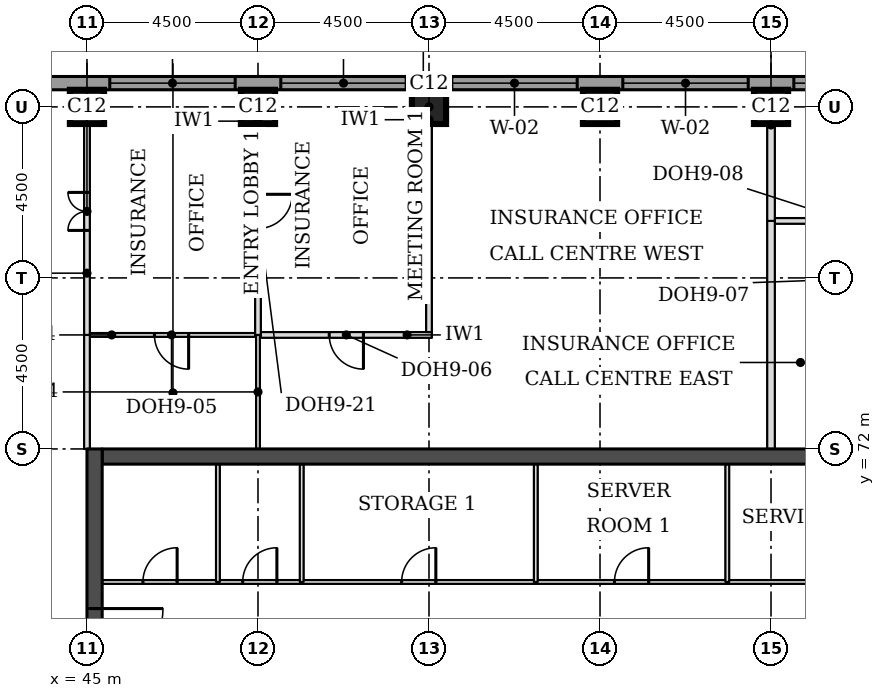
"""IFC4 building model, lengths in metres.
Left out: names, types, materials, properties, quantities, classifications, styles, units other than length and angle.
Written with IfcOpenShell. Run it as: python <this file> out.ifc"""

import sys

from ifc_helpers import new_model, si_unit, direction, frame, frame_2d, origin, origin_2d, place, context, subcontext, project, spatial, rectangle, extrude, element, fill, save


model = new_model("IFC4")
c1 = context("Model", 3, precision=1e-05, world=origin(), true_north=direction((0.0, 1.0)))
c2 = subcontext(c1, "Body", "Model", "MODEL_VIEW")
j1 = project(units=[si_unit("LENGTHUNIT", "METRE"), si_unit("PLANEANGLEUNIT", "RADIAN")], contexts=[c1])
p1 = place(None, origin())
s1 = spatial("IfcSite", under=j1, at=p1, CompositionType="ELEMENT")
p2 = place(p1, origin())
s2 = spatial("IfcBuilding", under=s1, at=p2, CompositionType="ELEMENT")
p3 = place(p2, frame((0.0, 0.0, 215.6)))
s3 = spatial("IfcBuildingStorey", under=s2, at=p3, CompositionType="ELEMENT", Elevation=215.6)
for number, where, z_axis, x_axis in (
    (1, (45.0, 81.0, 0.0), (0.0, 0.0, 1.0), (1.0, 0.0, 0.0)),
    (2, (49.5, 81.0, 0.0), (0.0, 0.0, 1.0), (1.0, 0.0, 0.0)),
    (3, (54.0, 81.0, 0.0), (0.0, 0.0, 1.0), (1.0, 0.0, 0.0)),
    (4, (58.5, 81.0, 0.0), (0.0, 0.0, 1.0), (1.0, 0.0, 0.0)),
    (5, (63.0, 81.0, 0.0), (0.0, 0.0, 1.0), (1.0, 0.0, 0.0)),
):
    element("IfcColumn", number, at=place(p3, frame(where, z_axis=z_axis, x_axis=x_axis)), inside=s3, PredefinedType="COLUMN", context=c2, shape_type="SweptSolid", body=[
        extrude(rectangle(XDim=0.9, YDim=0.9, at=origin_2d()), origin(), (0.0, 0.0, 1.0), 3.7),
    ])
p4 = place(p3, frame((45.4, 71.8, 0.0), z_axis=(0.0, 0.0, 1.0), x_axis=(1.0, 0.0, 0.0)))
e6 = element("IfcWall", 6, at=p4, inside=s3, PredefinedType="SHEAR", context=c2, shape_type="SweptSolid", body=[
    extrude(rectangle(XDim=21.7, YDim=0.4, at=frame_2d((10.85, 0.0))), origin(), (0.0, 0.0, 1.0), 3.7),
])
p5 = place(p3, frame((45.2, 49.5, 0.0), z_axis=(0.0, 0.0, 1.0), x_axis=(0.0, 1.0, 0.0)))
e7 = element("IfcWall", 7, at=p5, inside=s3, PredefinedType="SHEAR", context=c2, shape_type="SweptSolid", body=[
    extrude(rectangle(XDim=22.5, YDim=0.4, at=frame_2d((11.25, 0.0))), origin(), (0.0, 0.0, 1.0), 3.7),
])
p6 = place(p5, frame((4.2, 0.0, 0.0)))
e8 = element("IfcOpeningElement", 8, at=p6, cuts=e7, PredefinedType="OPENING", context=c2, shape_type="SweptSolid", body=[
    extrude(rectangle(XDim=1.8, YDim=2.1, at=frame_2d((0.9, 1.05))), frame((0.0, 0.21, 0.0), z_axis=(0.0, -1.0, 0.0), x_axis=(1.0, 0.0, 0.0)), (0.0, 0.0, 1.0), 0.42),
])
p7 = place(p5, frame((6.9, 0.0, 0.0)))
e9 = element("IfcOpeningElement", 9, at=p7, cuts=e7, PredefinedType="OPENING", context=c2, shape_type="SweptSolid", body=[
    extrude(rectangle(XDim=1.1, YDim=2.1, at=frame_2d((0.55, 1.05))), frame((0.0, 0.21, 0.0), z_axis=(0.0, -1.0, 0.0), x_axis=(1.0, 0.0, 0.0)), (0.0, 0.0, 1.0), 0.42),
])
p8 = place(p5, frame((13.6, 0.0, 0.0)))
e10 = element("IfcOpeningElement", 10, at=p8, cuts=e7, PredefinedType="OPENING", context=c2, shape_type="SweptSolid", body=[
    extrude(rectangle(XDim=1.1, YDim=2.1, at=frame_2d((0.55, 1.05))), frame((0.0, 0.21, 0.0), z_axis=(0.0, -1.0, 0.0), x_axis=(1.0, 0.0, 0.0)), (0.0, 0.0, 1.0), 0.42),
])
p9 = place(p5, frame((16.5, 0.0, 0.0)))
e11 = element("IfcOpeningElement", 11, at=p9, cuts=e7, PredefinedType="OPENING", context=c2, shape_type="SweptSolid", body=[
    extrude(rectangle(XDim=1.8, YDim=2.1, at=frame_2d((0.9, 1.05))), frame((0.0, 0.21, 0.0), z_axis=(0.0, -1.0, 0.0), x_axis=(1.0, 0.0, 0.0)), (0.0, 0.0, 1.0), 0.42),
])
p10 = place(p3, frame((72.331, 81.625, 0.0), z_axis=(0.0, 0.0, 1.0), x_axis=(-1.0, 0.0, 0.0)))
e12 = element("IfcWall", 12, at=p10, inside=s3, PredefinedType="STANDARD", context=c2, shape_type="SweptSolid", body=[
    extrude(rectangle(XDim=32.163, YDim=0.35, at=frame_2d((16.081, 0.0))), origin(), (0.0, 0.0, 1.0), 3.525),
])
p11 = place(p10, frame((5.431, 0.0, 0.9)))
e13 = element("IfcOpeningElement", 13, at=p11, cuts=e12, PredefinedType="OPENING", context=c2, shape_type="SweptSolid", body=[
    extrude(rectangle(XDim=3.3, YDim=1.9, at=frame_2d((1.65, 0.95))), frame((0.0, 0.185, 0.0), z_axis=(0.0, -1.0, 0.0), x_axis=(1.0, 0.0, 0.0)), (0.0, 0.0, 1.0), 0.37),
])
p12 = place(p10, frame((9.931, 0.0, 0.9)))
e14 = element("IfcOpeningElement", 14, at=p12, cuts=e12, PredefinedType="OPENING", context=c2, shape_type="SweptSolid", body=[
    extrude(rectangle(XDim=3.3, YDim=1.9, at=frame_2d((1.65, 0.95))), frame((0.0, 0.185, 0.0), z_axis=(0.0, -1.0, 0.0), x_axis=(1.0, 0.0, 0.0)), (0.0, 0.0, 1.0), 0.37),
])
p13 = place(p10, frame((14.431, 0.0, 0.9)))
e15 = element("IfcOpeningElement", 15, at=p13, cuts=e12, PredefinedType="OPENING", context=c2, shape_type="SweptSolid", body=[
    extrude(rectangle(XDim=3.3, YDim=1.9, at=frame_2d((1.65, 0.95))), frame((0.0, 0.185, 0.0), z_axis=(0.0, -1.0, 0.0), x_axis=(1.0, 0.0, 0.0)), (0.0, 0.0, 1.0), 0.37),
])
p14 = place(p10, frame((18.931, 0.0, 0.9)))
e16 = element("IfcOpeningElement", 16, at=p14, cuts=e12, PredefinedType="OPENING", context=c2, shape_type="SweptSolid", body=[
    extrude(rectangle(XDim=3.3, YDim=1.9, at=frame_2d((1.65, 0.95))), frame((0.0, 0.185, 0.0), z_axis=(0.0, -1.0, 0.0), x_axis=(1.0, 0.0, 0.0)), (0.0, 0.0, 1.0), 0.37),
])
p15 = place(p10, frame((23.431, 0.0, 0.9)))
e17 = element("IfcOpeningElement", 17, at=p15, cuts=e12, PredefinedType="OPENING", context=c2, shape_type="SweptSolid", body=[
    extrude(rectangle(XDim=3.3, YDim=1.9, at=frame_2d((1.65, 0.95))), frame((0.0, 0.185, 0.0), z_axis=(0.0, -1.0, 0.0), x_axis=(1.0, 0.0, 0.0)), (0.0, 0.0, 1.0), 0.37),
])
p16 = place(p3, frame((45.075, 75.0, 0.0), z_axis=(0.0, 0.0, 1.0), x_axis=(1.0, 0.0, 0.0)))
e18 = element("IfcWall", 18, at=p16, inside=s3, PredefinedType="PARTITIONING", context=c2, shape_type="SweptSolid", body=[
    extrude(rectangle(XDim=4.35, YDim=0.1, at=frame_2d((2.175, 0.0))), origin(), (0.0, 0.0, 1.0), 3.55),
])
p17 = place(p16, frame((1.7, 0.0, 0.0)))
e19 = element("IfcOpeningElement", 19, at=p17, cuts=e18, PredefinedType="OPENING", context=c2, shape_type="SweptSolid", body=[
    extrude(rectangle(XDim=0.9, YDim=2.1, at=frame_2d((0.45, 1.05))), frame((0.0, 0.06, 0.0), z_axis=(0.0, -1.0, 0.0), x_axis=(1.0, 0.0, 0.0)), (0.0, 0.0, 1.0), 0.12),
])
p18 = place(p3, frame((49.575, 75.0, 0.0), z_axis=(0.0, 0.0, 1.0), x_axis=(1.0, 0.0, 0.0)))
e20 = element("IfcWall", 20, at=p18, inside=s3, PredefinedType="PARTITIONING", context=c2, shape_type="SweptSolid", body=[
    extrude(rectangle(XDim=4.5, YDim=0.15, at=frame_2d((2.25, 0.0))), origin(), (0.0, 0.0, 1.0), 3.55),
])
p19 = place(p18, frame((1.8, 0.0, 0.0)))
e21 = element("IfcOpeningElement", 21, at=p19, cuts=e20, PredefinedType="OPENING", context=c2, shape_type="SweptSolid", body=[
    extrude(rectangle(XDim=0.9, YDim=2.1, at=frame_2d((0.45, 1.05))), frame((0.0, 0.085, 0.0), z_axis=(0.0, -1.0, 0.0), x_axis=(1.0, 0.0, 0.0)), (0.0, 0.0, 1.0), 0.17),
])
p20 = place(p3, frame((63.1, 78.0, 0.0), z_axis=(0.0, 0.0, 1.0), x_axis=(1.0, 0.0, 0.0)))
e22 = element("IfcWall", 22, at=p20, inside=s3, PredefinedType="PARTITIONING", context=c2, shape_type="SweptSolid", body=[
    extrude(rectangle(XDim=4.325, YDim=0.15, at=frame_2d((2.163, 0.0))), origin(), (0.0, 0.0, 1.0), 3.55),
])
p21 = place(p20, frame((1.45, 0.0, 0.0)))
e23 = element("IfcOpeningElement", 23, at=p21, cuts=e22, PredefinedType="OPENING", context=c2, shape_type="SweptSolid", body=[
    extrude(rectangle(XDim=0.9, YDim=2.1, at=frame_2d((0.45, 1.05))), frame((0.0, 0.085, 0.0), z_axis=(0.0, -1.0, 0.0), x_axis=(1.0, 0.0, 0.0)), (0.0, 0.0, 1.0), 0.17),
])
p22 = place(p3, frame((45.0, 72.0, 0.0), z_axis=(0.0, 0.0, 1.0), x_axis=(0.0, 1.0, 0.0)))
e24 = element("IfcWall", 24, at=p22, inside=s3, PredefinedType="PARTITIONING", context=c2, shape_type="SweptSolid", body=[
    extrude(rectangle(XDim=3.0, YDim=0.15, at=frame_2d((1.5, 0.0))), origin(), (0.0, 0.0, 1.0), 3.022),
])
p23 = place(p3, frame((49.5, 72.0, 0.0), z_axis=(0.0, 0.0, 1.0), x_axis=(0.0, 1.0, 0.0)))
e25 = element("IfcWall", 25, at=p23, inside=s3, PredefinedType="PARTITIONING", context=c2, shape_type="SweptSolid", body=[
    extrude(rectangle(XDim=3.0, YDim=0.1, at=frame_2d((1.5, 0.0))), origin(), (0.0, 0.0, 1.0), 3.55),
])
p24 = place(p3, frame((63.0, 72.0, 0.0), z_axis=(0.0, 0.0, 1.0), x_axis=(0.0, 1.0, 0.0)))
e26 = element("IfcWall", 26, at=p24, inside=s3, PredefinedType="PARTITIONING", context=c2, shape_type="SweptSolid", body=[
    extrude(rectangle(XDim=6.0, YDim=0.2, at=frame_2d((3.0, 0.0))), origin(), (0.0, 0.0, 1.0), 3.55),
])
p25 = place(p3, frame((45.0, 75.0, 0.0), z_axis=(0.0, 0.0, 1.0), x_axis=(0.0, 1.0, 0.0)))
e27 = element("IfcWall", 27, at=p25, inside=s3, PredefinedType="PARTITIONING", context=c2, shape_type="SweptSolid", body=[
    extrude(rectangle(XDim=6.45, YDim=0.15, at=frame_2d((3.225, 0.0))), origin(), (0.0, 0.0, 1.0), 3.022),
])
p26 = place(p25, frame((2.75, 0.0, 0.0)))
e28 = element("IfcOpeningElement", 28, at=p26, cuts=e27, PredefinedType="OPENING", context=c2, shape_type="SweptSolid", body=[
    extrude(rectangle(XDim=1.0, YDim=2.1, at=frame_2d((0.5, 1.05))), frame((0.0, 0.085, 0.0), z_axis=(0.0, -1.0, 0.0), x_axis=(1.0, 0.0, 0.0)), (0.0, 0.0, 1.0), 0.17),
])
p27 = place(p3, frame((49.5, 75.0, 0.0), z_axis=(0.0, 0.0, 1.0), x_axis=(0.0, 1.0, 0.0)))
e29 = element("IfcWall", 29, at=p27, inside=s3, PredefinedType="PARTITIONING", context=c2, shape_type="SweptSolid", body=[
    extrude(rectangle(XDim=6.45, YDim=0.15, at=frame_2d((3.225, 0.0))), origin(), (0.0, 0.0, 1.0), 3.55),
])
p28 = place(p27, frame((2.8, 0.0, 0.0)))
e30 = element("IfcOpeningElement", 30, at=p28, cuts=e29, PredefinedType="OPENING", context=c2, shape_type="SweptSolid", body=[
    extrude(rectangle(XDim=0.9, YDim=2.1, at=frame_2d((0.45, 1.05))), frame((0.0, 0.085, 0.0), z_axis=(0.0, -1.0, 0.0), x_axis=(1.0, 0.0, 0.0)), (0.0, 0.0, 1.0), 0.17),
])
p29 = place(p3, frame((54.0, 75.075, 0.0), z_axis=(0.0, 0.0, 1.0), x_axis=(0.0, 1.0, 0.0)))
e31 = element("IfcWall", 31, at=p29, inside=s3, PredefinedType="PARTITIONING", context=c2, shape_type="SweptSolid", body=[
    extrude(rectangle(XDim=6.375, YDim=0.15, at=frame_2d((3.188, 0.0))), origin(), (0.0, 0.0, 1.0), 3.55),
])
p30 = place(p3, frame((63.0, 78.0, 0.0), z_axis=(0.0, 0.0, 1.0), x_axis=(0.0, 1.0, 0.0)))
e32 = element("IfcWall", 32, at=p30, inside=s3, PredefinedType="PARTITIONING", context=c2, shape_type="SweptSolid", body=[
    extrude(rectangle(XDim=3.45, YDim=0.2, at=frame_2d((1.725, 0.0))), origin(), (0.0, 0.0, 1.0), 3.55),
])
p31 = place(p3, frame((45.4, 68.5, 0.0), z_axis=(0.0, 0.0, 1.0), x_axis=(1.0, 0.0, 0.0)))
e33 = element("IfcWall", 33, at=p31, inside=s3, PredefinedType="PARTITIONING", context=c2, shape_type="SweptSolid", body=[
    extrude(rectangle(XDim=21.7, YDim=0.1, at=frame_2d((10.85, 0.0))), origin(), (0.0, 0.0, 1.0), 3.55),
])
p32 = place(p31, frame((18.625, 0.0, 0.0)))
e34 = element("IfcOpeningElement", 34, at=p32, cuts=e33, PredefinedType="OPENING", context=c2, shape_type="SweptSolid", body=[
    extrude(rectangle(XDim=0.9, YDim=2.1, at=frame_2d((0.45, 1.05))), frame((0.0, 0.06, 0.0), z_axis=(0.0, -1.0, 0.0), x_axis=(1.0, 0.0, 0.0)), (0.0, 0.0, 1.0), 0.12),
])
p33 = place(p31, frame((1.073, 0.0, 0.0)))
e35 = element("IfcOpeningElement", 35, at=p33, cuts=e33, PredefinedType="OPENING", context=c2, shape_type="SweptSolid", body=[
    extrude(rectangle(XDim=0.9, YDim=2.1, at=frame_2d((0.45, 1.05))), frame((0.0, 0.06, 0.0), z_axis=(0.0, -1.0, 0.0), x_axis=(1.0, 0.0, 0.0)), (0.0, 0.0, 1.0), 0.12),
])
p34 = place(p31, frame((3.698, 0.0, 0.0)))
e36 = element("IfcOpeningElement", 36, at=p34, cuts=e33, PredefinedType="OPENING", context=c2, shape_type="SweptSolid", body=[
    extrude(rectangle(XDim=0.9, YDim=2.1, at=frame_2d((0.45, 1.05))), frame((0.0, 0.06, 0.0), z_axis=(0.0, -1.0, 0.0), x_axis=(1.0, 0.0, 0.0)), (0.0, 0.0, 1.0), 0.12),
])
p35 = place(p31, frame((13.48, 0.0, 0.0)))
e37 = element("IfcOpeningElement", 37, at=p35, cuts=e33, PredefinedType="OPENING", context=c2, shape_type="SweptSolid", body=[
    extrude(rectangle(XDim=0.9, YDim=2.1, at=frame_2d((0.45, 1.05))), frame((0.0, 0.06, 0.0), z_axis=(0.0, -1.0, 0.0), x_axis=(1.0, 0.0, 0.0)), (0.0, 0.0, 1.0), 0.12),
])
p36 = place(p31, frame((7.88, 0.0, 0.0)))
e38 = element("IfcOpeningElement", 38, at=p36, cuts=e33, PredefinedType="OPENING", context=c2, shape_type="SweptSolid", body=[
    extrude(rectangle(XDim=0.9, YDim=2.1, at=frame_2d((0.45, 1.05))), frame((0.0, 0.06, 0.0), z_axis=(0.0, -1.0, 0.0), x_axis=(1.0, 0.0, 0.0)), (0.0, 0.0, 1.0), 0.12),
])
for number, where, z_axis, x_axis in (
    (39, (48.445, 68.5, 0.0), (0.0, 0.0, 1.0), (0.0, 1.0, 0.0)),
    (40, (50.65, 68.5, 0.0), (0.0, 0.0, 1.0), (0.0, 1.0, 0.0)),
    (41, (56.81, 68.5, 0.0), (0.0, 0.0, 1.0), (0.0, 1.0, 0.0)),
    (42, (61.85, 68.5, 0.0), (0.0, 0.0, 1.0), (0.0, 1.0, 0.0)),
):
    element("IfcWall", number, at=place(p3, frame(where, z_axis=z_axis, x_axis=x_axis)), inside=s3, PredefinedType="PARTITIONING", context=c2, shape_type="SweptSolid", body=[
        extrude(rectangle(XDim=3.1, YDim=0.1, at=frame_2d((1.55, 0.0))), origin(), (0.0, 0.0, 1.0), 3.55),
    ])
p37 = place(p11, origin())
e43 = element("IfcWindow", 43, at=p37, inside=s3, PartitioningType="SINGLE_PANEL", PredefinedType="WINDOW", context=c2, shape_type="SweptSolid", body=[
    extrude(rectangle(XDim=3.3, YDim=1.9, at=frame_2d((1.65, 0.95))), frame((0.0, 0.085, 0.0), z_axis=(0.0, -1.0, 0.0), x_axis=(1.0, 0.0, 0.0)), (0.0, 0.0, 1.0), 0.06),
])
fill(e13, e43)
p38 = place(p12, origin())
e44 = element("IfcWindow", 44, at=p38, inside=s3, PartitioningType="SINGLE_PANEL", PredefinedType="WINDOW", context=c2, shape_type="SweptSolid", body=[
    extrude(rectangle(XDim=3.3, YDim=1.9, at=frame_2d((1.65, 0.95))), frame((0.0, 0.085, 0.0), z_axis=(0.0, -1.0, 0.0), x_axis=(1.0, 0.0, 0.0)), (0.0, 0.0, 1.0), 0.06),
])
fill(e14, e44)
p39 = place(p13, origin())
e45 = element("IfcWindow", 45, at=p39, inside=s3, PartitioningType="SINGLE_PANEL", PredefinedType="WINDOW", context=c2, shape_type="SweptSolid", body=[
    extrude(rectangle(XDim=3.3, YDim=1.9, at=frame_2d((1.65, 0.95))), frame((0.0, 0.085, 0.0), z_axis=(0.0, -1.0, 0.0), x_axis=(1.0, 0.0, 0.0)), (0.0, 0.0, 1.0), 0.06),
])
fill(e15, e45)
p40 = place(p14, origin())
e46 = element("IfcWindow", 46, at=p40, inside=s3, PartitioningType="SINGLE_PANEL", PredefinedType="WINDOW", context=c2, shape_type="SweptSolid", body=[
    extrude(rectangle(XDim=3.3, YDim=1.9, at=frame_2d((1.65, 0.95))), frame((0.0, 0.085, 0.0), z_axis=(0.0, -1.0, 0.0), x_axis=(1.0, 0.0, 0.0)), (0.0, 0.0, 1.0), 0.06),
])
fill(e16, e46)
p41 = place(p15, origin())
e47 = element("IfcWindow", 47, at=p41, inside=s3, PartitioningType="SINGLE_PANEL", PredefinedType="WINDOW", context=c2, shape_type="SweptSolid", body=[
    extrude(rectangle(XDim=3.3, YDim=1.9, at=frame_2d((1.65, 0.95))), frame((0.0, 0.085, 0.0), z_axis=(0.0, -1.0, 0.0), x_axis=(1.0, 0.0, 0.0)), (0.0, 0.0, 1.0), 0.06),
])
fill(e17, e47)
p42 = place(p26, origin())
e48 = element("IfcDoor", 48, at=p42, inside=s3, OperationType="DOUBLE_DOOR_SINGLE_SWING", PredefinedType="DOOR", context=c2, shape_type="SweptSolid", body=[
    extrude(rectangle(XDim=1.0, YDim=2.1, at=frame_2d((0.5, 1.05))), frame((0.0, 0.025, 0.0), z_axis=(0.0, -1.0, 0.0), x_axis=(1.0, 0.0, 0.0)), (0.0, 0.0, 1.0), 0.05),
])
fill(e28, e48)
p43 = place(p28, frame((0.9, 0.0, 0.0), z_axis=(0.0, 0.0, 1.0), x_axis=(-1.0, 0.0, 0.0)))
e49 = element("IfcDoor", 49, at=p43, inside=s3, OperationType="SINGLE_SWING_LEFT", PredefinedType="DOOR", context=c2, shape_type="SweptSolid", body=[
    extrude(rectangle(XDim=0.9, YDim=2.1, at=frame_2d((0.45, 1.05))), frame((0.0, 0.025, 0.0), z_axis=(0.0, -1.0, 0.0), x_axis=(1.0, 0.0, 0.0)), (0.0, 0.0, 1.0), 0.05),
])
fill(e30, e49)
p44 = place(p17, frame((0.9, 0.0, 0.0), z_axis=(0.0, 0.0, 1.0), x_axis=(-1.0, 0.0, 0.0)))
e50 = element("IfcDoor", 50, at=p44, inside=s3, OperationType="SINGLE_SWING_LEFT", PredefinedType="DOOR", context=c2, shape_type="SweptSolid", body=[
    extrude(rectangle(XDim=0.9, YDim=2.1, at=frame_2d((0.45, 1.05))), frame((0.0, 0.025, 0.0), z_axis=(0.0, -1.0, 0.0), x_axis=(1.0, 0.0, 0.0)), (0.0, 0.0, 1.0), 0.05),
])
fill(e19, e50)
p45 = place(p19, frame((0.9, 0.0, 0.0), z_axis=(0.0, 0.0, 1.0), x_axis=(-1.0, 0.0, 0.0)))
e51 = element("IfcDoor", 51, at=p45, inside=s3, OperationType="SINGLE_SWING_LEFT", PredefinedType="DOOR", context=c2, shape_type="SweptSolid", body=[
    extrude(rectangle(XDim=0.9, YDim=2.1, at=frame_2d((0.45, 1.05))), frame((0.0, 0.025, 0.0), z_axis=(0.0, -1.0, 0.0), x_axis=(1.0, 0.0, 0.0)), (0.0, 0.0, 1.0), 0.05),
])
fill(e21, e51)
p46 = place(p9, frame((1.8, 0.0, 0.0), z_axis=(0.0, 0.0, 1.0), x_axis=(-1.0, 0.0, 0.0)))
e52 = element("IfcDoor", 52, at=p46, inside=s3, OperationType="SINGLE_SWING_LEFT", PredefinedType="DOOR", context=c2, shape_type="SweptSolid", body=[
    extrude(rectangle(XDim=1.8, YDim=2.1, at=frame_2d((0.9, 1.05))), frame((0.0, 0.025, 0.0), z_axis=(0.0, -1.0, 0.0), x_axis=(1.0, 0.0, 0.0)), (0.0, 0.0, 1.0), 0.05),
])
fill(e11, e52)
p47 = place(p33, origin())
e53 = element("IfcDoor", 53, at=p47, inside=s3, OperationType="SINGLE_SWING_RIGHT", PredefinedType="DOOR", context=c2, shape_type="SweptSolid", body=[
    extrude(rectangle(XDim=0.9, YDim=2.1, at=frame_2d((0.45, 1.05))), frame((0.0, 0.025, 0.0), z_axis=(0.0, -1.0, 0.0), x_axis=(1.0, 0.0, 0.0)), (0.0, 0.0, 1.0), 0.05),
])
fill(e35, e53)
p48 = place(p34, origin())
e54 = element("IfcDoor", 54, at=p48, inside=s3, OperationType="SINGLE_SWING_RIGHT", PredefinedType="DOOR", context=c2, shape_type="SweptSolid", body=[
    extrude(rectangle(XDim=0.9, YDim=2.1, at=frame_2d((0.45, 1.05))), frame((0.0, 0.025, 0.0), z_axis=(0.0, -1.0, 0.0), x_axis=(1.0, 0.0, 0.0)), (0.0, 0.0, 1.0), 0.05),
])
fill(e36, e54)
p49 = place(p35, origin())
e55 = element("IfcDoor", 55, at=p49, inside=s3, OperationType="SINGLE_SWING_RIGHT", PredefinedType="DOOR", context=c2, shape_type="SweptSolid", body=[
    extrude(rectangle(XDim=0.9, YDim=2.1, at=frame_2d((0.45, 1.05))), frame((0.0, 0.025, 0.0), z_axis=(0.0, -1.0, 0.0), x_axis=(1.0, 0.0, 0.0)), (0.0, 0.0, 1.0), 0.05),
])
fill(e37, e55)
p50 = place(p36, origin())
e56 = element("IfcDoor", 56, at=p50, inside=s3, OperationType="SINGLE_SWING_RIGHT", PredefinedType="DOOR", context=c2, shape_type="SweptSolid", body=[
    extrude(rectangle(XDim=0.9, YDim=2.1, at=frame_2d((0.45, 1.05))), frame((0.0, 0.025, 0.0), z_axis=(0.0, -1.0, 0.0), x_axis=(1.0, 0.0, 0.0)), (0.0, 0.0, 1.0), 0.05),
])
fill(e38, e56)
save(model, sys.argv[1])
